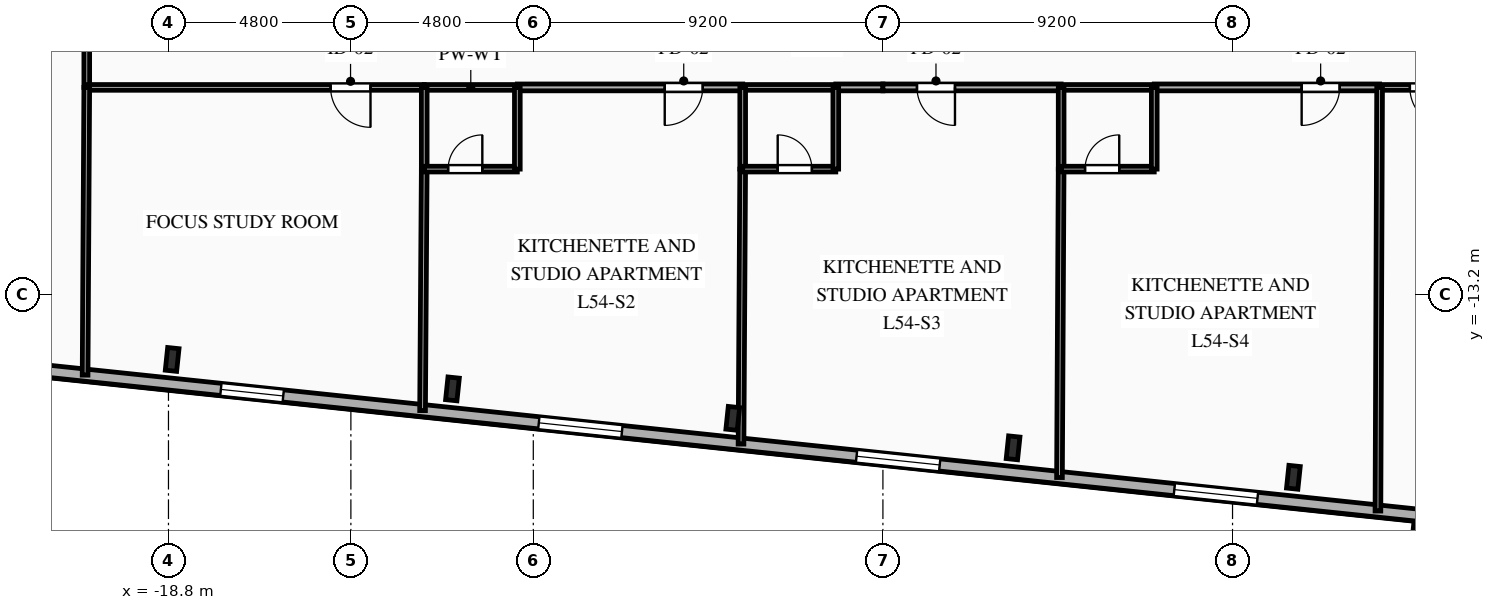
"""IFC4 building model, lengths in metres.
Left out: names, types, materials, properties, quantities, classifications, styles, units other than length and angle.
Written with IfcOpenShell. Run it as: python <this file> out.ifc"""

import sys

from ifc_helpers import new_model, si_unit, direction, frame, frame_2d, origin, origin_2d, place, context, subcontext, project, spatial, rectangle, i_section, extrude, element, fill, save


model = new_model("IFC4")
c1 = context("Model", 3, precision=1e-05, world=origin(), true_north=direction((0.0, 1.0)))
c2 = subcontext(c1, "Body", "Model", "MODEL_VIEW")
j1 = project(units=[si_unit("LENGTHUNIT", "METRE"), si_unit("PLANEANGLEUNIT", "RADIAN")], contexts=[c1])
p1 = place(None, origin())
s1 = spatial("IfcSite", under=j1, at=p1, CompositionType="ELEMENT")
p2 = place(p1, origin())
s2 = spatial("IfcBuilding", under=s1, at=p2, CompositionType="ELEMENT")
p3 = place(p2, frame((0.0, 0.0, 193.05)))
s3 = spatial("IfcBuildingStorey", under=s2, at=p3, CompositionType="ELEMENT", Elevation=193.05)
for number, where, z_axis, x_axis in (
    (1, (-18.703, -14.908, 0.0), (0.0, 0.0, 1.0), (0.995, -0.105, 0.0)),
    (2, (-11.327, -15.683, 0.0), (0.0, 0.0, 1.0), (0.995, -0.105, 0.0)),
    (3, (-3.951, -16.458, 0.0), (0.0, 0.0, 1.0), (0.995, -0.105, 0.0)),
    (4, (3.425, -17.233, 0.0), (0.0, 0.0, 1.0), (0.995, -0.105, 0.0)),
    (5, (10.801, -18.009, 0.0), (0.0, 0.0, 1.0), (0.995, -0.105, 0.0)),
):
    element("IfcColumn", number, at=place(p3, frame(where, z_axis=z_axis, x_axis=x_axis)), inside=s3, PredefinedType="COLUMN", context=c2, shape_type="SweptSolid", body=[
        extrude(i_section(OverallWidth=0.3, OverallDepth=0.6, WebThickness=0.015, FlangeThickness=0.03, FilletRadius=0.027, at=origin_2d()), origin(), (0.0, 0.0, 1.0), 3.35),
    ])
p4 = place(p3, frame((18.756, -19.498, 0.0), z_axis=(0.0, 0.0, 1.0), x_axis=(-0.994522060044, 0.104526896475, 0.0)))
e6 = element("IfcWall", 6, at=p4, inside=s3, PredefinedType="SOLIDWALL", context=c2, shape_type="SweptSolid", body=[
    extrude(rectangle(XDim=45.8, YDim=0.32, at=frame_2d((22.9, 0.0))), origin(), (0.0, 0.0, 1.0), 3.04),
])
p5 = place(p4, frame((3.018, 0.0, 0.85)))
e7 = element("IfcOpeningElement", 7, at=p5, cuts=e6, PredefinedType="OPENING", context=c2, shape_type="SweptSolid", body=[
    extrude(rectangle(XDim=1.65, YDim=1.85, at=frame_2d((0.825, 0.925))), frame((0.0, 0.17, 0.0), z_axis=(0.0, -1.0, 0.0), x_axis=(1.0, 0.0, 0.0)), (0.0, 0.0, 1.0), 0.34),
])
p6 = place(p4, frame((8.949, 0.0, 0.85)))
e8 = element("IfcOpeningElement", 8, at=p6, cuts=e6, PredefinedType="OPENING", context=c2, shape_type="SweptSolid", body=[
    extrude(rectangle(XDim=2.2, YDim=1.85, at=frame_2d((1.1, 0.925))), frame((0.0, 0.17, 0.0), z_axis=(0.0, -1.0, 0.0), x_axis=(1.0, 0.0, 0.0)), (0.0, 0.0, 1.0), 0.34),
])
p7 = place(p4, frame((17.356, 0.0, 0.85)))
e9 = element("IfcOpeningElement", 9, at=p7, cuts=e6, PredefinedType="OPENING", context=c2, shape_type="SweptSolid", body=[
    extrude(rectangle(XDim=2.2, YDim=1.85, at=frame_2d((1.1, 0.925))), frame((0.0, 0.17, 0.0), z_axis=(0.0, -1.0, 0.0), x_axis=(1.0, 0.0, 0.0)), (0.0, 0.0, 1.0), 0.34),
])
p8 = place(p4, frame((25.763, 0.0, 0.85)))
e10 = element("IfcOpeningElement", 10, at=p8, cuts=e6, PredefinedType="OPENING", context=c2, shape_type="SweptSolid", body=[
    extrude(rectangle(XDim=2.2, YDim=1.85, at=frame_2d((1.1, 0.925))), frame((0.0, 0.17, 0.0), z_axis=(0.0, -1.0, 0.0), x_axis=(1.0, 0.0, 0.0)), (0.0, 0.0, 1.0), 0.34),
])
p9 = place(p4, frame((34.726, 0.0, 0.85)))
e11 = element("IfcOpeningElement", 11, at=p9, cuts=e6, PredefinedType="OPENING", context=c2, shape_type="SweptSolid", body=[
    extrude(rectangle(XDim=1.65, YDim=1.85, at=frame_2d((0.825, 0.925))), frame((0.0, 0.17, 0.0), z_axis=(0.0, -1.0, 0.0), x_axis=(1.0, 0.0, 0.0)), (0.0, 0.0, 1.0), 0.34),
])
p10 = place(p4, frame((41.892, 0.0, 0.85)))
e12 = element("IfcOpeningElement", 12, at=p10, cuts=e6, PredefinedType="OPENING", context=c2, shape_type="SweptSolid", body=[
    extrude(rectangle(XDim=1.65, YDim=1.85, at=frame_2d((0.825, 0.925))), frame((0.0, 0.17, 0.0), z_axis=(0.0, -1.0, 0.0), x_axis=(1.0, 0.0, 0.0)), (0.0, 0.0, 1.0), 0.34),
])
p11 = place(p3, frame((-20.95, -7.75, 0.0), z_axis=(0.0, 0.0, 1.0), x_axis=(0.0, 1.0, 0.0)))
e13 = element("IfcWall", 13, at=p11, inside=s3, PredefinedType="PARTITIONING", context=c2, shape_type="SweptSolid", body=[
    extrude(rectangle(XDim=2.15, YDim=0.15, at=frame_2d((1.075, 0.0))), origin(), (0.0, 0.0, 1.0), 3.04),
])
p12 = place(p3, frame((-12.07, -7.75, 0.0), z_axis=(0.0, 0.0, 1.0), x_axis=(-1.0, 0.0, 0.0)))
e14 = element("IfcWall", 14, at=p12, inside=s3, PredefinedType="PARTITIONING", context=c2, shape_type="SweptSolid", body=[
    extrude(rectangle(XDim=8.88, YDim=0.15, at=frame_2d((4.44, 0.0))), origin(), (0.0, 0.0, 1.0), 3.04),
])
p13 = place(p12, frame((1.414, 0.0, 0.0)))
e15 = element("IfcOpeningElement", 15, at=p13, cuts=e14, PredefinedType="OPENING", context=c2, shape_type="SweptSolid", body=[
    extrude(rectangle(XDim=1.05, YDim=2.15, at=frame_2d((0.525, 1.075))), frame((0.0, 0.085, 0.0), z_axis=(0.0, -1.0, 0.0), x_axis=(1.0, 0.0, 0.0)), (0.0, 0.0, 1.0), 0.17),
])
p14 = place(p3, frame((-3.69, -7.75, 0.0), z_axis=(0.0, 0.0, 1.0), x_axis=(-1.0, 0.0, 0.0)))
e16 = element("IfcWall", 16, at=p14, inside=s3, PredefinedType="PARTITIONING", context=c2, shape_type="SweptSolid", body=[
    extrude(rectangle(XDim=5.93, YDim=0.18, at=frame_2d((2.965, 0.0))), origin(), (0.0, 0.0, 1.0), 3.04),
])
p15 = place(p14, frame((1.051, 0.0, 0.0)))
e17 = element("IfcOpeningElement", 17, at=p15, cuts=e16, PredefinedType="OPENING", context=c2, shape_type="SweptSolid", body=[
    extrude(rectangle(XDim=1.0, YDim=2.15, at=frame_2d((0.5, 1.075))), frame((0.0, 0.1, 0.0), z_axis=(0.0, -1.0, 0.0), x_axis=(1.0, 0.0, 0.0)), (0.0, 0.0, 1.0), 0.2),
])
p16 = place(p3, frame((-9.62, -7.75, 0.0), z_axis=(0.0, 0.0, 1.0), x_axis=(-1.0, 0.0, 0.0)))
e18 = element("IfcWall", 18, at=p16, inside=s3, PredefinedType="PLUMBINGWALL", context=c2, shape_type="SweptSolid", body=[
    extrude(rectangle(XDim=2.45, YDim=0.15, at=frame_2d((1.225, 0.0))), origin(), (0.0, 0.0, 1.0), 3.04),
])
p17 = place(p3, frame((0.0, -7.75, 0.0), z_axis=(0.0, 0.0, 1.0), x_axis=(-1.0, 0.0, 0.0)))
e19 = element("IfcWall", 19, at=p17, inside=s3, PredefinedType="PARTITIONING", context=c2, shape_type="SweptSolid", body=[
    extrude(rectangle(XDim=1.24, YDim=0.18, at=frame_2d((0.62, 0.0))), origin(), (0.0, 0.0, 1.0), 3.04),
])
p18 = place(p3, frame((-1.24, -7.75, 0.0), z_axis=(0.0, 0.0, 1.0), x_axis=(-1.0, 0.0, 0.0)))
e20 = element("IfcWall", 20, at=p18, inside=s3, PredefinedType="PLUMBINGWALL", context=c2, shape_type="SweptSolid", body=[
    extrude(rectangle(XDim=2.45, YDim=0.15, at=frame_2d((1.225, 0.0))), origin(), (0.0, 0.0, 1.0), 3.04),
])
p19 = place(p3, frame((4.69, -7.75, 0.0), z_axis=(0.0, 0.0, 1.0), x_axis=(-1.0, 0.0, 0.0)))
e21 = element("IfcWall", 21, at=p19, inside=s3, PredefinedType="PARTITIONING", context=c2, shape_type="SweptSolid", body=[
    extrude(rectangle(XDim=4.69, YDim=0.18, at=frame_2d((2.345, 0.0))), origin(), (0.0, 0.0, 1.0), 3.04),
])
p20 = place(p19, frame((2.794, 0.0, 0.0)))
e22 = element("IfcOpeningElement", 22, at=p20, cuts=e21, PredefinedType="OPENING", context=c2, shape_type="SweptSolid", body=[
    extrude(rectangle(XDim=1.0, YDim=2.15, at=frame_2d((0.5, 1.075))), frame((0.0, 0.1, 0.0), z_axis=(0.0, -1.0, 0.0), x_axis=(1.0, 0.0, 0.0)), (0.0, 0.0, 1.0), 0.2),
])
p21 = place(p3, frame((13.07, -7.75, 0.0), z_axis=(0.0, 0.0, 1.0), x_axis=(-1.0, 0.0, 0.0)))
e23 = element("IfcWall", 23, at=p21, inside=s3, PredefinedType="PARTITIONING", context=c2, shape_type="SweptSolid", body=[
    extrude(rectangle(XDim=5.93, YDim=0.18, at=frame_2d((2.965, 0.0))), origin(), (0.0, 0.0, 1.0), 3.04),
])
p22 = place(p21, frame((1.051, 0.0, 0.0)))
e24 = element("IfcOpeningElement", 24, at=p22, cuts=e23, PredefinedType="OPENING", context=c2, shape_type="SweptSolid", body=[
    extrude(rectangle(XDim=1.0, YDim=2.15, at=frame_2d((0.5, 1.075))), frame((0.0, 0.1, 0.0), z_axis=(0.0, -1.0, 0.0), x_axis=(1.0, 0.0, 0.0)), (0.0, 0.0, 1.0), 0.2),
])
p23 = place(p3, frame((7.14, -7.75, 0.0), z_axis=(0.0, 0.0, 1.0), x_axis=(-1.0, 0.0, 0.0)))
e25 = element("IfcWall", 25, at=p23, inside=s3, PredefinedType="PLUMBINGWALL", context=c2, shape_type="SweptSolid", body=[
    extrude(rectangle(XDim=2.45, YDim=0.15, at=frame_2d((1.225, 0.0))), origin(), (0.0, 0.0, 1.0), 3.04),
])
p24 = place(p3, frame((17.01, -7.75, 0.0), z_axis=(0.0, 0.0, 1.0), x_axis=(-1.0, 0.0, 0.0)))
e26 = element("IfcWall", 26, at=p24, inside=s3, PredefinedType="PARTITIONING", context=c2, shape_type="SweptSolid", body=[
    extrude(rectangle(XDim=3.94, YDim=0.15, at=frame_2d((1.97, 0.0))), origin(), (0.0, 0.0, 1.0), 3.04),
])
p25 = place(p24, frame((2.094, 0.0, 0.0)))
e27 = element("IfcOpeningElement", 27, at=p25, cuts=e26, PredefinedType="OPENING", context=c2, shape_type="SweptSolid", body=[
    extrude(rectangle(XDim=1.05, YDim=2.15, at=frame_2d((0.525, 1.075))), frame((0.0, 0.085, 0.0), z_axis=(0.0, -1.0, 0.0), x_axis=(1.0, 0.0, 0.0)), (0.0, 0.0, 1.0), 0.17),
])
p26 = place(p3, frame((-20.95, -7.75, 0.0), z_axis=(0.0, 0.0, 1.0), x_axis=(-0.005804668564, -0.99998315277, 0.0)))
e28 = element("IfcWall", 28, at=p26, inside=s3, PredefinedType="PARTITIONING", context=c2, shape_type="SweptSolid", body=[
    extrude(rectangle(XDim=7.571, YDim=0.15, at=frame_2d((3.785, 0.0))), origin(), (0.0, 0.0, 1.0), 3.04),
])
p27 = place(p3, frame((-12.07, -9.9, 0.0), z_axis=(0.0, 0.0, 1.0), x_axis=(-0.006915995357, -0.999976084218, 0.0)))
e29 = element("IfcWall", 29, at=p27, inside=s3, PredefinedType="PARTITIONING", context=c2, shape_type="SweptSolid", body=[
    extrude(rectangle(XDim=6.354, YDim=0.15, at=frame_2d((3.177, 0.0))), origin(), (0.0, 0.0, 1.0), 3.04),
])
p28 = place(p3, frame((-12.07, -7.75, 0.0), z_axis=(0.0, 0.0, 1.0), x_axis=(0.0, -1.0, 0.0)))
e30 = element("IfcWall", 30, at=p28, inside=s3, PredefinedType="PLUMBINGWALL", context=c2, shape_type="SweptSolid", body=[
    extrude(rectangle(XDim=2.15, YDim=0.15, at=frame_2d((1.075, 0.0))), origin(), (0.0, 0.0, 1.0), 3.04),
])
p29 = place(p3, frame((-12.07, -9.9, 0.0), z_axis=(0.0, 0.0, 1.0), x_axis=(1.0, 0.0, 0.0)))
e31 = element("IfcWall", 31, at=p29, inside=s3, PredefinedType="PLUMBINGWALL", context=c2, shape_type="SweptSolid", body=[
    extrude(rectangle(XDim=2.45, YDim=0.15, at=frame_2d((1.225, 0.0))), origin(), (0.0, 0.0, 1.0), 3.04),
])
p30 = place(p29, frame((0.629, 0.0, 0.0)))
e32 = element("IfcOpeningElement", 32, at=p30, cuts=e31, PredefinedType="OPENING", context=c2, shape_type="SweptSolid", body=[
    extrude(rectangle(XDim=0.9, YDim=2.1, at=frame_2d((0.45, 1.05))), frame((0.0, 0.085, 0.0), z_axis=(0.0, -1.0, 0.0), x_axis=(1.0, 0.0, 0.0)), (0.0, 0.0, 1.0), 0.17),
])
p31 = place(p3, frame((-9.62, -9.9, 0.0), z_axis=(0.0, 0.0, 1.0), x_axis=(0.0, 1.0, 0.0)))
e33 = element("IfcWall", 33, at=p31, inside=s3, PredefinedType="PLUMBINGWALL", context=c2, shape_type="SweptSolid", body=[
    extrude(rectangle(XDim=2.15, YDim=0.15, at=frame_2d((1.075, 0.0))), origin(), (0.0, 0.0, 1.0), 2.665),
])
p32 = place(p3, frame((-3.69, -9.9, 0.0), z_axis=(0.0, 0.0, 1.0), x_axis=(-0.006074196988, -0.999981551895, 0.0)))
e34 = element("IfcWall", 34, at=p32, inside=s3, PredefinedType="PARTITIONING", context=c2, shape_type="SweptSolid", body=[
    extrude(rectangle(XDim=7.235, YDim=0.15, at=frame_2d((3.617, 0.0))), origin(), (0.0, 0.0, 1.0), 3.04),
])
p33 = place(p3, frame((-3.69, -7.75, 0.0), z_axis=(0.0, 0.0, 1.0), x_axis=(0.0, -1.0, 0.0)))
e35 = element("IfcWall", 35, at=p33, inside=s3, PredefinedType="PLUMBINGWALL", context=c2, shape_type="SweptSolid", body=[
    extrude(rectangle(XDim=2.15, YDim=0.15, at=frame_2d((1.075, 0.0))), origin(), (0.0, 0.0, 1.0), 3.04),
])
p34 = place(p3, frame((-3.69, -9.9, 0.0), z_axis=(0.0, 0.0, 1.0), x_axis=(1.0, 0.0, 0.0)))
e36 = element("IfcWall", 36, at=p34, inside=s3, PredefinedType="PLUMBINGWALL", context=c2, shape_type="SweptSolid", body=[
    extrude(rectangle(XDim=2.45, YDim=0.15, at=frame_2d((1.225, 0.0))), origin(), (0.0, 0.0, 1.0), 3.04),
])
p35 = place(p34, frame((0.921, 0.0, 0.0)))
e37 = element("IfcOpeningElement", 37, at=p35, cuts=e36, PredefinedType="OPENING", context=c2, shape_type="SweptSolid", body=[
    extrude(rectangle(XDim=0.9, YDim=2.1, at=frame_2d((0.45, 1.05))), frame((0.0, 0.085, 0.0), z_axis=(0.0, -1.0, 0.0), x_axis=(1.0, 0.0, 0.0)), (0.0, 0.0, 1.0), 0.17),
])
p36 = place(p3, frame((-1.24, -9.9, 0.0), z_axis=(0.0, 0.0, 1.0), x_axis=(0.0, 1.0, 0.0)))
e38 = element("IfcWall", 38, at=p36, inside=s3, PredefinedType="PLUMBINGWALL", context=c2, shape_type="SweptSolid", body=[
    extrude(rectangle(XDim=2.15, YDim=0.15, at=frame_2d((1.075, 0.0))), origin(), (0.0, 0.0, 1.0), 3.04),
])
p37 = place(p3, frame((4.69, -9.9, 0.0), z_axis=(0.0, 0.0, 1.0), x_axis=(-0.005414920161, -0.999985339212, 0.0)))
e39 = element("IfcWall", 39, at=p37, inside=s3, PredefinedType="PARTITIONING", context=c2, shape_type="SweptSolid", body=[
    extrude(rectangle(XDim=8.115, YDim=0.15, at=frame_2d((4.058, 0.0))), origin(), (0.0, 0.0, 1.0), 3.04),
])
p38 = place(p3, frame((4.69, -7.75, 0.0), z_axis=(0.0, 0.0, 1.0), x_axis=(0.0, -1.0, 0.0)))
e40 = element("IfcWall", 40, at=p38, inside=s3, PredefinedType="PLUMBINGWALL", context=c2, shape_type="SweptSolid", body=[
    extrude(rectangle(XDim=2.15, YDim=0.15, at=frame_2d((1.075, 0.0))), origin(), (0.0, 0.0, 1.0), 3.04),
])
p39 = place(p3, frame((4.69, -9.9, 0.0), z_axis=(0.0, 0.0, 1.0), x_axis=(1.0, 0.0, 0.0)))
e41 = element("IfcWall", 41, at=p39, inside=s3, PredefinedType="PLUMBINGWALL", context=c2, shape_type="SweptSolid", body=[
    extrude(rectangle(XDim=2.45, YDim=0.15, at=frame_2d((1.225, 0.0))), origin(), (0.0, 0.0, 1.0), 3.04),
])
p40 = place(p39, frame((0.629, 0.0, 0.0)))
e42 = element("IfcOpeningElement", 42, at=p40, cuts=e41, PredefinedType="OPENING", context=c2, shape_type="SweptSolid", body=[
    extrude(rectangle(XDim=0.9, YDim=2.1, at=frame_2d((0.45, 1.05))), frame((0.0, 0.085, 0.0), z_axis=(0.0, -1.0, 0.0), x_axis=(1.0, 0.0, 0.0)), (0.0, 0.0, 1.0), 0.17),
])
p41 = place(p3, frame((7.14, -9.9, 0.0), z_axis=(0.0, 0.0, 1.0), x_axis=(0.0, 1.0, 0.0)))
e43 = element("IfcWall", 43, at=p41, inside=s3, PredefinedType="PLUMBINGWALL", context=c2, shape_type="SweptSolid", body=[
    extrude(rectangle(XDim=2.15, YDim=0.15, at=frame_2d((1.075, 0.0))), origin(), (0.0, 0.0, 1.0), 3.04),
])
p42 = place(p3, frame((13.07, -7.75, 0.0), z_axis=(0.0, 0.0, 1.0), x_axis=(-0.003942582434, -0.999992227992, 0.0)))
e44 = element("IfcWall", 44, at=p42, inside=s3, PredefinedType="PARTITIONING", context=c2, shape_type="SweptSolid", body=[
    extrude(rectangle(XDim=11.146, YDim=0.15, at=frame_2d((5.573, 0.0))), origin(), (0.0, 0.0, 1.0), 3.04),
])
p43 = place(p6, origin())
e45 = element("IfcWindow", 45, at=p43, inside=s3, PartitioningType="SINGLE_PANEL", PredefinedType="WINDOW", context=c2, shape_type="SweptSolid", body=[
    extrude(rectangle(XDim=2.2, YDim=1.85, at=frame_2d((1.1, 0.925))), frame((0.0, 0.03, 0.0), z_axis=(0.0, -1.0, 0.0), x_axis=(1.0, 0.0, 0.0)), (0.0, 0.0, 1.0), 0.06),
])
fill(e8, e45)
p44 = place(p7, origin())
e46 = element("IfcWindow", 46, at=p44, inside=s3, PartitioningType="SINGLE_PANEL", PredefinedType="WINDOW", context=c2, shape_type="SweptSolid", body=[
    extrude(rectangle(XDim=2.2, YDim=1.85, at=frame_2d((1.1, 0.925))), frame((0.0, 0.03, 0.0), z_axis=(0.0, -1.0, 0.0), x_axis=(1.0, 0.0, 0.0)), (0.0, 0.0, 1.0), 0.06),
])
fill(e9, e46)
p45 = place(p8, origin())
e47 = element("IfcWindow", 47, at=p45, inside=s3, PartitioningType="SINGLE_PANEL", PredefinedType="WINDOW", context=c2, shape_type="SweptSolid", body=[
    extrude(rectangle(XDim=2.2, YDim=1.85, at=frame_2d((1.1, 0.925))), frame((0.0, 0.03, 0.0), z_axis=(0.0, -1.0, 0.0), x_axis=(1.0, 0.0, 0.0)), (0.0, 0.0, 1.0), 0.06),
])
fill(e10, e47)
p46 = place(p9, origin())
e48 = element("IfcWindow", 48, at=p46, inside=s3, PartitioningType="SINGLE_PANEL", PredefinedType="WINDOW", context=c2, shape_type="SweptSolid", body=[
    extrude(rectangle(XDim=1.65, YDim=1.85, at=frame_2d((0.825, 0.925))), frame((0.0, 0.03, 0.0), z_axis=(0.0, -1.0, 0.0), x_axis=(1.0, 0.0, 0.0)), (0.0, 0.0, 1.0), 0.06),
])
fill(e11, e48)
p47 = place(p13, origin())
e49 = element("IfcDoor", 49, at=p47, inside=s3, OperationType="SINGLE_SWING_LEFT", PredefinedType="DOOR", context=c2, shape_type="SweptSolid", body=[
    extrude(rectangle(XDim=1.05, YDim=2.15, at=frame_2d((0.525, 1.075))), frame((0.0, 0.025, 0.0), z_axis=(0.0, -1.0, 0.0), x_axis=(1.0, 0.0, 0.0)), (0.0, 0.0, 1.0), 0.05),
])
fill(e15, e49)
p48 = place(p15, origin())
e50 = element("IfcDoor", 50, at=p48, inside=s3, OperationType="SINGLE_SWING_RIGHT", PredefinedType="DOOR", context=c2, shape_type="SweptSolid", body=[
    extrude(rectangle(XDim=1.0, YDim=2.15, at=frame_2d((0.5, 1.075))), frame((0.0, 0.025, 0.0), z_axis=(0.0, -1.0, 0.0), x_axis=(1.0, 0.0, 0.0)), (0.0, 0.0, 1.0), 0.05),
])
fill(e17, e50)
p49 = place(p20, origin())
e51 = element("IfcDoor", 51, at=p49, inside=s3, OperationType="SINGLE_SWING_LEFT", PredefinedType="DOOR", context=c2, shape_type="SweptSolid", body=[
    extrude(rectangle(XDim=1.0, YDim=2.15, at=frame_2d((0.5, 1.075))), frame((0.0, 0.025, 0.0), z_axis=(0.0, -1.0, 0.0), x_axis=(1.0, 0.0, 0.0)), (0.0, 0.0, 1.0), 0.05),
])
fill(e22, e51)
p50 = place(p22, origin())
e52 = element("IfcDoor", 52, at=p50, inside=s3, OperationType="SINGLE_SWING_RIGHT", PredefinedType="DOOR", context=c2, shape_type="SweptSolid", body=[
    extrude(rectangle(XDim=1.0, YDim=2.15, at=frame_2d((0.5, 1.075))), frame((0.0, 0.025, 0.0), z_axis=(0.0, -1.0, 0.0), x_axis=(1.0, 0.0, 0.0)), (0.0, 0.0, 1.0), 0.05),
])
fill(e24, e52)
p51 = place(p25, origin())
e53 = element("IfcDoor", 53, at=p51, inside=s3, OperationType="SINGLE_SWING_LEFT", PredefinedType="DOOR", context=c2, shape_type="SweptSolid", body=[
    extrude(rectangle(XDim=1.05, YDim=2.15, at=frame_2d((0.525, 1.075))), frame((0.0, 0.025, 0.0), z_axis=(0.0, -1.0, 0.0), x_axis=(1.0, 0.0, 0.0)), (0.0, 0.0, 1.0), 0.05),
])
fill(e27, e53)
p52 = place(p30, origin())
e54 = element("IfcDoor", 54, at=p52, inside=s3, OperationType="SINGLE_SWING_RIGHT", PredefinedType="DOOR", context=c2, shape_type="SweptSolid", body=[
    extrude(rectangle(XDim=0.9, YDim=2.1, at=frame_2d((0.45, 1.05))), frame((0.0, 0.025, 0.0), z_axis=(0.0, -1.0, 0.0), x_axis=(1.0, 0.0, 0.0)), (0.0, 0.0, 1.0), 0.05),
])
fill(e32, e54)
p53 = place(p35, origin())
e55 = element("IfcDoor", 55, at=p53, inside=s3, OperationType="SINGLE_SWING_LEFT", PredefinedType="DOOR", context=c2, shape_type="SweptSolid", body=[
    extrude(rectangle(XDim=0.9, YDim=2.1, at=frame_2d((0.45, 1.05))), frame((0.0, 0.025, 0.0), z_axis=(0.0, -1.0, 0.0), x_axis=(1.0, 0.0, 0.0)), (0.0, 0.0, 1.0), 0.05),
])
fill(e37, e55)
p54 = place(p40, origin())
e56 = element("IfcDoor", 56, at=p54, inside=s3, OperationType="SINGLE_SWING_RIGHT", PredefinedType="DOOR", context=c2, shape_type="SweptSolid", body=[
    extrude(rectangle(XDim=0.9, YDim=2.1, at=frame_2d((0.45, 1.05))), frame((0.0, 0.025, 0.0), z_axis=(0.0, -1.0, 0.0), x_axis=(1.0, 0.0, 0.0)), (0.0, 0.0, 1.0), 0.05),
])
fill(e42, e56)
save(model, sys.argv[1])
